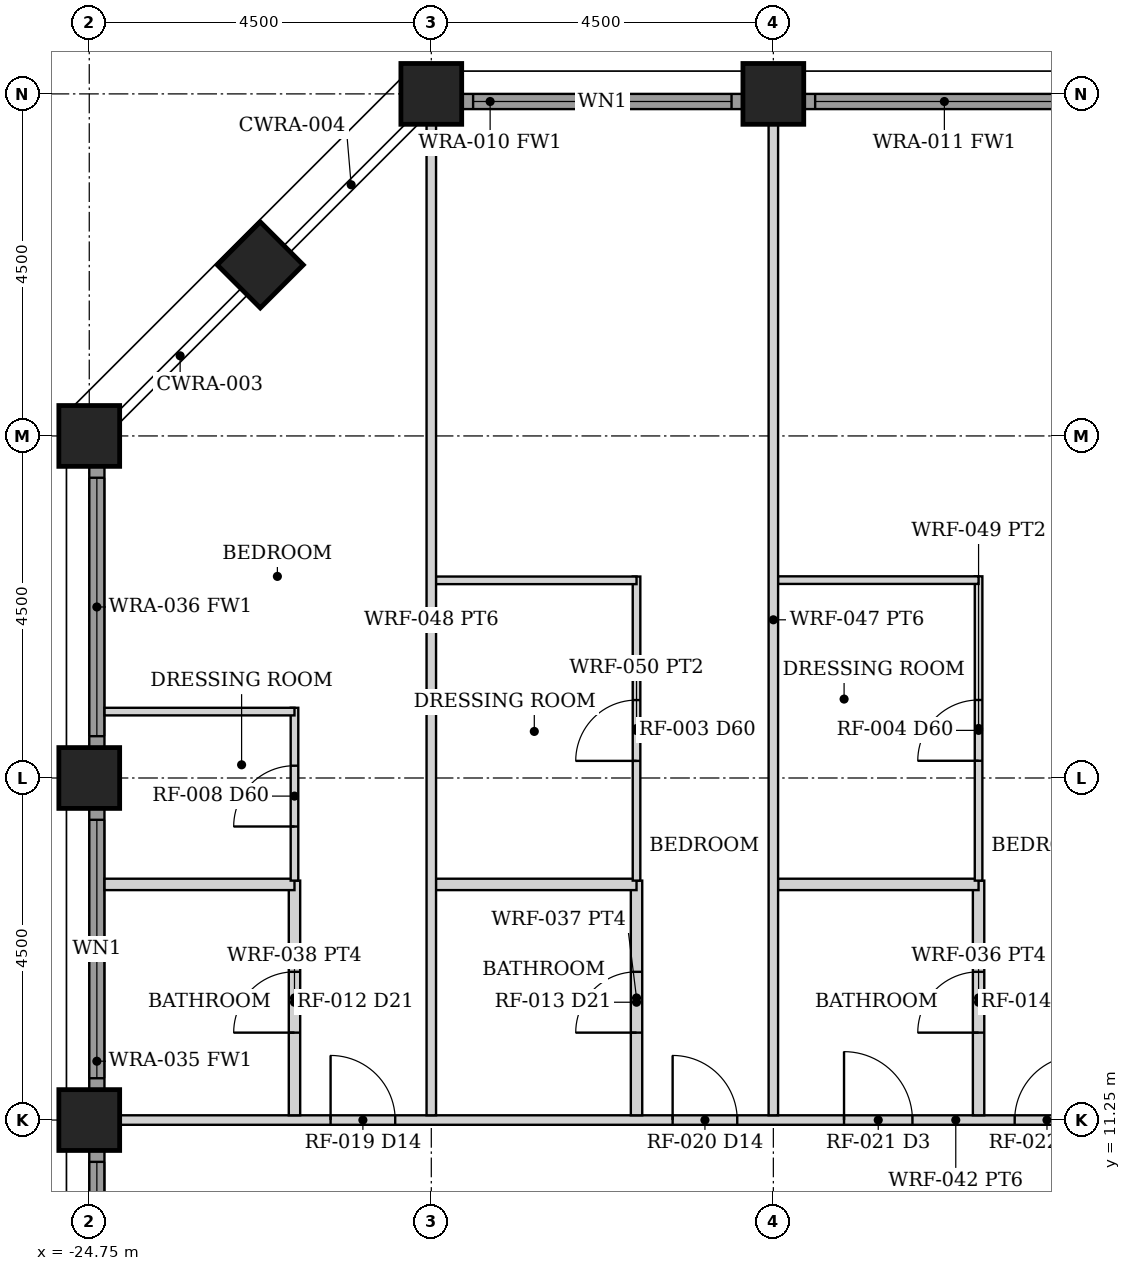
"""IFC4 building model, lengths in metres.
Left out: names, types, materials, properties, quantities, classifications, styles, units other than length and angle.
Written with IfcOpenShell. Run it as: python <this file> out.ifc"""

import sys

from ifc_helpers import new_model, si_unit, direction, frame, frame_2d, origin, origin_2d, place, context, subcontext, project, spatial, rectangle, hollow_rectangle, extrude, element, fill, save


model = new_model("IFC4")
c1 = context("Model", 3, precision=1e-05, world=origin(), true_north=direction((0.0, 1.0)))
c2 = subcontext(c1, "Body", "Model", "MODEL_VIEW")
j1 = project(units=[si_unit("LENGTHUNIT", "METRE"), si_unit("PLANEANGLEUNIT", "RADIAN")], contexts=[c1])
p1 = place(None, origin())
s1 = spatial("IfcSite", under=j1, at=p1, CompositionType="ELEMENT")
p2 = place(p1, origin())
s2 = spatial("IfcBuilding", under=s1, at=p2, CompositionType="ELEMENT")
p3 = place(p2, frame((0.0, 0.0, 79.0)))
s3 = spatial("IfcBuildingStorey", under=s2, at=p3, CompositionType="ELEMENT", Elevation=79.0)
for number, where, z_axis, x_axis in (
    (1, (-20.25, 24.75, 0.0), (0.0, 0.0, 1.0), (0.0, 1.0, 0.0)),
    (2, (-15.75, 24.75, 0.0), (0.0, 0.0, 1.0), (0.0, 1.0, 0.0)),
    (3, (-24.75, 11.25, 0.0), (0.0, 0.0, 1.0), (1.0, 0.0, 0.0)),
    (4, (-24.75, 15.75, 0.0), (0.0, 0.0, 1.0), (1.0, 0.0, 0.0)),
    (5, (-24.75, 20.25, 0.0), (0.0, 0.0, 1.0), (1.0, 0.0, 0.0)),
    (6, (-22.5, 22.5, 0.0), (0.0, 0.0, 1.0), (0.707, -0.707, 0.0)),
):
    element("IfcColumn", number, at=place(p3, frame(where, z_axis=z_axis, x_axis=x_axis)), inside=s3, PredefinedType="COLUMN", context=c2, shape_type="SweptSolid", body=[
        extrude(hollow_rectangle(XDim=0.8, YDim=0.8, WallThickness=0.06, at=origin_2d()), origin(), (0.0, 0.0, 1.0), 3.5),
    ])
p4 = place(p3, frame((-19.845, 24.65, 0.0), z_axis=(0.0, 0.0, 1.0), x_axis=(1.0, 0.0, 0.0)))
e7 = element("IfcWall", 7, at=p4, inside=s3, PredefinedType="SOLIDWALL", context=c2, shape_type="SweptSolid", body=[
    extrude(rectangle(XDim=3.69, YDim=0.2, at=frame_2d((1.845, 0.0))), origin(), (0.0, 0.0, 1.0), 2.379),
])
p5 = place(p4, frame((0.145, 0.0, 0.3)))
e8 = element("IfcOpeningElement", 8, at=p5, cuts=e7, PredefinedType="OPENING", context=c2, shape_type="SweptSolid", body=[
    extrude(rectangle(XDim=3.4, YDim=1.929, at=frame_2d((1.7, 0.964))), frame((0.0, 0.11, 0.0), z_axis=(0.0, -1.0, 0.0), x_axis=(1.0, 0.0, 0.0)), (0.0, 0.0, 1.0), 0.22),
])
p6 = place(p3, frame((-15.345, 24.65, 0.0), z_axis=(0.0, 0.0, 1.0), x_axis=(1.0, 0.0, 0.0)))
e9 = element("IfcWall", 9, at=p6, inside=s3, PredefinedType="SOLIDWALL", context=c2, shape_type="SweptSolid", body=[
    extrude(rectangle(XDim=3.69, YDim=0.2, at=frame_2d((1.845, 0.0))), origin(), (0.0, 0.0, 1.0), 2.379),
])
p7 = place(p6, frame((0.145, 0.0, 0.3)))
e10 = element("IfcOpeningElement", 10, at=p7, cuts=e9, PredefinedType="OPENING", context=c2, shape_type="SweptSolid", body=[
    extrude(rectangle(XDim=3.4, YDim=1.929, at=frame_2d((1.7, 0.964))), frame((0.0, 0.11, 0.0), z_axis=(0.0, -1.0, 0.0), x_axis=(1.0, 0.0, 0.0)), (0.0, 0.0, 1.0), 0.22),
])
p8 = place(p3, frame((-24.65, 7.155, 0.0), z_axis=(0.0, 0.0, 1.0), x_axis=(0.0, 1.0, 0.0)))
e11 = element("IfcWall", 11, at=p8, inside=s3, PredefinedType="SOLIDWALL", context=c2, shape_type="SweptSolid", body=[
    extrude(rectangle(XDim=3.69, YDim=0.2, at=frame_2d((1.845, 0.0))), origin(), (0.0, 0.0, 1.0), 2.379),
])
p9 = place(p8, frame((0.145, 0.0, 0.3)))
e12 = element("IfcOpeningElement", 12, at=p9, cuts=e11, PredefinedType="OPENING", context=c2, shape_type="SweptSolid", body=[
    extrude(rectangle(XDim=3.4, YDim=1.929, at=frame_2d((1.7, 0.964))), frame((0.0, 0.11, 0.0), z_axis=(0.0, -1.0, 0.0), x_axis=(1.0, 0.0, 0.0)), (0.0, 0.0, 1.0), 0.22),
])
p10 = place(p3, frame((-24.65, 11.655, 0.0), z_axis=(0.0, 0.0, 1.0), x_axis=(0.0, 1.0, 0.0)))
e13 = element("IfcWall", 13, at=p10, inside=s3, PredefinedType="SOLIDWALL", context=c2, shape_type="SweptSolid", body=[
    extrude(rectangle(XDim=3.69, YDim=0.2, at=frame_2d((1.845, 0.0))), origin(), (0.0, 0.0, 1.0), 2.379),
])
p11 = place(p10, frame((0.145, 0.0, 0.3)))
e14 = element("IfcOpeningElement", 14, at=p11, cuts=e13, PredefinedType="OPENING", context=c2, shape_type="SweptSolid", body=[
    extrude(rectangle(XDim=3.4, YDim=1.929, at=frame_2d((1.7, 0.964))), frame((0.0, 0.11, 0.0), z_axis=(0.0, -1.0, 0.0), x_axis=(1.0, 0.0, 0.0)), (0.0, 0.0, 1.0), 0.22),
])
p12 = place(p3, frame((-24.65, 16.155, 0.0), z_axis=(0.0, 0.0, 1.0), x_axis=(0.0, 1.0, 0.0)))
e15 = element("IfcWall", 15, at=p12, inside=s3, PredefinedType="SOLIDWALL", context=c2, shape_type="SweptSolid", body=[
    extrude(rectangle(XDim=3.69, YDim=0.2, at=frame_2d((1.845, 0.0))), origin(), (0.0, 0.0, 1.0), 2.379),
])
p13 = place(p12, frame((0.145, 0.0, 0.3)))
e16 = element("IfcOpeningElement", 16, at=p13, cuts=e15, PredefinedType="OPENING", context=c2, shape_type="SweptSolid", body=[
    extrude(rectangle(XDim=3.4, YDim=1.929, at=frame_2d((1.7, 0.964))), frame((0.0, 0.11, 0.0), z_axis=(0.0, -1.0, 0.0), x_axis=(1.0, 0.0, 0.0)), (0.0, 0.0, 1.0), 0.22),
])
p14 = place(p3, frame((-24.35, 11.25, 0.0), z_axis=(0.0, 0.0, 1.0), x_axis=(1.0, 0.0, 0.0)))
e17 = element("IfcWall", 17, at=p14, inside=s3, PredefinedType="PARTITIONING", context=c2, shape_type="SweptSolid", body=[
    extrude(rectangle(XDim=22.0, YDim=0.125, at=frame_2d((11.0, 0.0))), origin(), (0.0, 0.0, 1.0), 2.373),
])
p15 = place(p14, frame((20.25, 0.0, 0.0)))
e18 = element("IfcOpeningElement", 18, at=p15, cuts=e17, PredefinedType="OPENING", context=c2, shape_type="SweptSolid", body=[
    extrude(rectangle(XDim=0.9, YDim=2.1, at=frame_2d((0.45, 1.05))), frame((0.0, 0.073, 0.0), z_axis=(0.0, -1.0, 0.0), x_axis=(1.0, 0.0, 0.0)), (0.0, 0.0, 1.0), 0.145),
])
p16 = place(p14, frame((14.65, 0.0, 0.0)))
e19 = element("IfcOpeningElement", 19, at=p16, cuts=e17, PredefinedType="OPENING", context=c2, shape_type="SweptSolid", body=[
    extrude(rectangle(XDim=1.4, YDim=2.1, at=frame_2d((0.7, 1.05))), frame((0.0, 0.073, 0.0), z_axis=(0.0, -1.0, 0.0), x_axis=(1.0, 0.0, 0.0)), (0.0, 0.0, 1.0), 0.145),
])
p17 = place(p14, frame((11.775, 0.0, 0.0)))
e20 = element("IfcOpeningElement", 20, at=p17, cuts=e17, PredefinedType="OPENING", context=c2, shape_type="SweptSolid", body=[
    extrude(rectangle(XDim=0.85, YDim=2.1, at=frame_2d((0.425, 1.05))), frame((0.0, 0.073, 0.0), z_axis=(0.0, -1.0, 0.0), x_axis=(1.0, 0.0, 0.0)), (0.0, 0.0, 1.0), 0.145),
])
p18 = place(p14, frame((9.53, 0.0, 0.0)))
e21 = element("IfcOpeningElement", 21, at=p18, cuts=e17, PredefinedType="OPENING", context=c2, shape_type="SweptSolid", body=[
    extrude(rectangle(XDim=0.9, YDim=2.1, at=frame_2d((0.45, 1.05))), frame((0.0, 0.073, 0.0), z_axis=(0.0, -1.0, 0.0), x_axis=(1.0, 0.0, 0.0)), (0.0, 0.0, 1.0), 0.145),
])
p19 = place(p14, frame((7.275, 0.0, 0.0)))
e22 = element("IfcOpeningElement", 22, at=p19, cuts=e17, PredefinedType="OPENING", context=c2, shape_type="SweptSolid", body=[
    extrude(rectangle(XDim=0.85, YDim=2.1, at=frame_2d((0.425, 1.05))), frame((0.0, 0.073, 0.0), z_axis=(0.0, -1.0, 0.0), x_axis=(1.0, 0.0, 0.0)), (0.0, 0.0, 1.0), 0.145),
])
p20 = place(p14, frame((2.775, 0.0, 0.0)))
e23 = element("IfcOpeningElement", 23, at=p20, cuts=e17, PredefinedType="OPENING", context=c2, shape_type="SweptSolid", body=[
    extrude(rectangle(XDim=0.85, YDim=2.1, at=frame_2d((0.425, 1.05))), frame((0.0, 0.073, 0.0), z_axis=(0.0, -1.0, 0.0), x_axis=(1.0, 0.0, 0.0)), (0.0, 0.0, 1.0), 0.145),
])
p21 = place(p3, frame((-13.05, 11.312, 0.0), z_axis=(0.0, 0.0, 1.0), x_axis=(0.0, 1.0, 0.0)))
e24 = element("IfcWall", 24, at=p21, inside=s3, PredefinedType="PARTITIONING", context=c2, shape_type="SweptSolid", body=[
    extrude(rectangle(XDim=3.087, YDim=0.15, at=frame_2d((1.544, 0.0))), origin(), (0.0, 0.0, 1.0), 2.373),
])
p22 = place(p21, frame((1.087, 0.0, 0.0)))
e25 = element("IfcOpeningElement", 25, at=p22, cuts=e24, PredefinedType="OPENING", context=c2, shape_type="SweptSolid", body=[
    extrude(rectangle(XDim=0.8, YDim=2.1, at=frame_2d((0.4, 1.05))), frame((0.0, 0.085, 0.0), z_axis=(0.0, -1.0, 0.0), x_axis=(1.0, 0.0, 0.0)), (0.0, 0.0, 1.0), 0.17),
])
p23 = place(p3, frame((-15.69, 14.35, 0.0), z_axis=(0.0, 0.0, 1.0), x_axis=(1.0, 0.0, 0.0)))
e26 = element("IfcWall", 26, at=p23, inside=s3, PredefinedType="PARTITIONING", context=c2, shape_type="SweptSolid", body=[
    extrude(rectangle(XDim=2.64, YDim=0.15, at=frame_2d((1.32, 0.0))), origin(), (0.0, 0.0, 1.0), 2.373),
])
p24 = place(p3, frame((-13.05, 14.4, 0.0), z_axis=(0.0, 0.0, 1.0), x_axis=(0.0, 1.0, 0.0)))
e27 = element("IfcWall", 27, at=p24, inside=s3, PredefinedType="PARTITIONING", context=c2, shape_type="SweptSolid", body=[
    extrude(rectangle(XDim=4.003, YDim=0.1, at=frame_2d((2.001, 0.0))), origin(), (0.0, 0.0, 1.0), 2.373),
])
p25 = place(p24, frame((1.576, 0.0, 0.0)))
e28 = element("IfcOpeningElement", 28, at=p25, cuts=e27, PredefinedType="OPENING", context=c2, shape_type="SweptSolid", body=[
    extrude(rectangle(XDim=0.8, YDim=2.1, at=frame_2d((0.4, 1.05))), frame((0.0, 0.06, 0.0), z_axis=(0.0, -1.0, 0.0), x_axis=(1.0, 0.0, 0.0)), (0.0, 0.0, 1.0), 0.12),
])
p26 = place(p3, frame((-15.69, 18.353, 0.0), z_axis=(0.0, 0.0, 1.0), x_axis=(1.0, 0.0, 0.0)))
e29 = element("IfcWall", 29, at=p26, inside=s3, PredefinedType="PARTITIONING", context=c2, shape_type="SweptSolid", body=[
    extrude(rectangle(XDim=2.64, YDim=0.1, at=frame_2d((1.32, 0.0))), origin(), (0.0, 0.0, 1.0), 2.373),
])
p27 = place(p3, frame((-15.75, 11.312, 0.0), z_axis=(0.0, 0.0, 1.0), x_axis=(0.0, 1.0, 0.0)))
e30 = element("IfcWall", 30, at=p27, inside=s3, PredefinedType="PARTITIONING", context=c2, shape_type="SweptSolid", body=[
    extrude(rectangle(XDim=13.038, YDim=0.125, at=frame_2d((6.519, 0.0))), origin(), (0.0, 0.0, 1.0), 2.373),
])
p28 = place(p3, frame((-17.55, 11.312, 0.0), z_axis=(0.0, 0.0, 1.0), x_axis=(0.0, 1.0, 0.0)))
e31 = element("IfcWall", 31, at=p28, inside=s3, PredefinedType="PARTITIONING", context=c2, shape_type="SweptSolid", body=[
    extrude(rectangle(XDim=3.087, YDim=0.15, at=frame_2d((1.544, 0.0))), origin(), (0.0, 0.0, 1.0), 2.373),
])
p29 = place(p28, frame((1.087, 0.0, 0.0)))
e32 = element("IfcOpeningElement", 32, at=p29, cuts=e31, PredefinedType="OPENING", context=c2, shape_type="SweptSolid", body=[
    extrude(rectangle(XDim=0.8, YDim=2.1, at=frame_2d((0.4, 1.05))), frame((0.0, 0.085, 0.0), z_axis=(0.0, -1.0, 0.0), x_axis=(1.0, 0.0, 0.0)), (0.0, 0.0, 1.0), 0.17),
])
p30 = place(p3, frame((-20.19, 14.35, 0.0), z_axis=(0.0, 0.0, 1.0), x_axis=(1.0, 0.0, 0.0)))
e33 = element("IfcWall", 33, at=p30, inside=s3, PredefinedType="PARTITIONING", context=c2, shape_type="SweptSolid", body=[
    extrude(rectangle(XDim=2.64, YDim=0.15, at=frame_2d((1.32, 0.0))), origin(), (0.0, 0.0, 1.0), 2.373),
])
p31 = place(p3, frame((-17.55, 14.4, 0.0), z_axis=(0.0, 0.0, 1.0), x_axis=(0.0, 1.0, 0.0)))
e34 = element("IfcWall", 34, at=p31, inside=s3, PredefinedType="PARTITIONING", context=c2, shape_type="SweptSolid", body=[
    extrude(rectangle(XDim=4.0, YDim=0.1, at=frame_2d((2.0, 0.0))), origin(), (0.0, 0.0, 1.0), 2.373),
])
p32 = place(p31, frame((1.575, 0.0, 0.0)))
e35 = element("IfcOpeningElement", 35, at=p32, cuts=e34, PredefinedType="OPENING", context=c2, shape_type="SweptSolid", body=[
    extrude(rectangle(XDim=0.8, YDim=2.1, at=frame_2d((0.4, 1.05))), frame((0.0, 0.06, 0.0), z_axis=(0.0, -1.0, 0.0), x_axis=(1.0, 0.0, 0.0)), (0.0, 0.0, 1.0), 0.12),
])
p33 = place(p3, frame((-20.19, 18.35, 0.0), z_axis=(0.0, 0.0, 1.0), x_axis=(1.0, 0.0, 0.0)))
e36 = element("IfcWall", 36, at=p33, inside=s3, PredefinedType="PARTITIONING", context=c2, shape_type="SweptSolid", body=[
    extrude(rectangle(XDim=2.64, YDim=0.1, at=frame_2d((1.32, 0.0))), origin(), (0.0, 0.0, 1.0), 2.373),
])
p34 = place(p3, frame((-20.25, 11.312, 0.0), z_axis=(0.0, 0.0, 1.0), x_axis=(0.0, 1.0, 0.0)))
e37 = element("IfcWall", 37, at=p34, inside=s3, PredefinedType="PARTITIONING", context=c2, shape_type="SweptSolid", body=[
    extrude(rectangle(XDim=13.038, YDim=0.125, at=frame_2d((6.519, 0.0))), origin(), (0.0, 0.0, 1.0), 2.373),
])
p35 = place(p3, frame((-22.05, 11.312, 0.0), z_axis=(0.0, 0.0, 1.0), x_axis=(0.0, 1.0, 0.0)))
e38 = element("IfcWall", 38, at=p35, inside=s3, PredefinedType="PARTITIONING", context=c2, shape_type="SweptSolid", body=[
    extrude(rectangle(XDim=3.087, YDim=0.15, at=frame_2d((1.544, 0.0))), origin(), (0.0, 0.0, 1.0), 2.373),
])
p36 = place(p35, frame((1.087, 0.0, 0.0)))
e39 = element("IfcOpeningElement", 39, at=p36, cuts=e38, PredefinedType="OPENING", context=c2, shape_type="SweptSolid", body=[
    extrude(rectangle(XDim=0.8, YDim=2.1, at=frame_2d((0.4, 1.05))), frame((0.0, 0.085, 0.0), z_axis=(0.0, -1.0, 0.0), x_axis=(1.0, 0.0, 0.0)), (0.0, 0.0, 1.0), 0.17),
])
p37 = place(p3, frame((-24.55, 14.35, 0.0), z_axis=(0.0, 0.0, 1.0), x_axis=(1.0, 0.0, 0.0)))
e40 = element("IfcWall", 40, at=p37, inside=s3, PredefinedType="PARTITIONING", context=c2, shape_type="SweptSolid", body=[
    extrude(rectangle(XDim=2.5, YDim=0.15, at=frame_2d((1.25, 0.0))), origin(), (0.0, 0.0, 1.0), 2.373),
])
p38 = place(p3, frame((-22.05, 14.4, 0.0), z_axis=(0.0, 0.0, 1.0), x_axis=(0.0, 1.0, 0.0)))
e41 = element("IfcWall", 41, at=p38, inside=s3, PredefinedType="PARTITIONING", context=c2, shape_type="SweptSolid", body=[
    extrude(rectangle(XDim=2.274, YDim=0.1, at=frame_2d((1.137, 0.0))), origin(), (0.0, 0.0, 1.0), 2.373),
])
p39 = place(p38, frame((0.712, 0.0, 0.0)))
e42 = element("IfcOpeningElement", 42, at=p39, cuts=e41, PredefinedType="OPENING", context=c2, shape_type="SweptSolid", body=[
    extrude(rectangle(XDim=0.8, YDim=2.1, at=frame_2d((0.4, 1.05))), frame((0.0, 0.06, 0.0), z_axis=(0.0, -1.0, 0.0), x_axis=(1.0, 0.0, 0.0)), (0.0, 0.0, 1.0), 0.12),
])
p40 = place(p3, frame((-24.55, 16.624, 0.0), z_axis=(0.0, 0.0, 1.0), x_axis=(1.0, 0.0, 0.0)))
e43 = element("IfcWall", 43, at=p40, inside=s3, PredefinedType="PARTITIONING", context=c2, shape_type="SweptSolid", body=[
    extrude(rectangle(XDim=2.5, YDim=0.1, at=frame_2d((1.25, 0.0))), origin(), (0.0, 0.0, 1.0), 2.373),
])
p41 = place(p5, origin())
e44 = element("IfcWindow", 44, at=p41, inside=s3, PartitioningType="SINGLE_PANEL", PredefinedType="WINDOW", context=c2, shape_type="SweptSolid", body=[
    extrude(rectangle(XDim=3.4, YDim=1.929, at=frame_2d((1.7, 0.964))), frame((0.0, 0.03, 0.0), z_axis=(0.0, -1.0, 0.0), x_axis=(1.0, 0.0, 0.0)), (0.0, 0.0, 1.0), 0.06),
])
fill(e8, e44)
p42 = place(p7, origin())
e45 = element("IfcWindow", 45, at=p42, inside=s3, PartitioningType="SINGLE_PANEL", PredefinedType="WINDOW", context=c2, shape_type="SweptSolid", body=[
    extrude(rectangle(XDim=3.4, YDim=1.929, at=frame_2d((1.7, 0.964))), frame((0.0, 0.03, 0.0), z_axis=(0.0, -1.0, 0.0), x_axis=(1.0, 0.0, 0.0)), (0.0, 0.0, 1.0), 0.06),
])
fill(e10, e45)
p43 = place(p9, origin())
e46 = element("IfcWindow", 46, at=p43, inside=s3, PartitioningType="SINGLE_PANEL", PredefinedType="WINDOW", context=c2, shape_type="SweptSolid", body=[
    extrude(rectangle(XDim=3.4, YDim=1.929, at=frame_2d((1.7, 0.964))), frame((0.0, 0.03, 0.0), z_axis=(0.0, -1.0, 0.0), x_axis=(1.0, 0.0, 0.0)), (0.0, 0.0, 1.0), 0.06),
])
fill(e12, e46)
p44 = place(p11, origin())
e47 = element("IfcWindow", 47, at=p44, inside=s3, PartitioningType="SINGLE_PANEL", PredefinedType="WINDOW", context=c2, shape_type="SweptSolid", body=[
    extrude(rectangle(XDim=3.4, YDim=1.929, at=frame_2d((1.7, 0.964))), frame((0.0, 0.03, 0.0), z_axis=(0.0, -1.0, 0.0), x_axis=(1.0, 0.0, 0.0)), (0.0, 0.0, 1.0), 0.06),
])
fill(e14, e47)
p45 = place(p13, origin())
e48 = element("IfcWindow", 48, at=p45, inside=s3, PartitioningType="SINGLE_PANEL", PredefinedType="WINDOW", context=c2, shape_type="SweptSolid", body=[
    extrude(rectangle(XDim=3.4, YDim=1.929, at=frame_2d((1.7, 0.964))), frame((0.0, 0.03, 0.0), z_axis=(0.0, -1.0, 0.0), x_axis=(1.0, 0.0, 0.0)), (0.0, 0.0, 1.0), 0.06),
])
fill(e16, e48)
p46 = place(p17, origin())
e49 = element("IfcDoor", 49, at=p46, inside=s3, OperationType="SINGLE_SWING_RIGHT", PredefinedType="DOOR", context=c2, shape_type="SweptSolid", body=[
    extrude(rectangle(XDim=0.85, YDim=2.1, at=frame_2d((0.425, 1.05))), frame((0.0, 0.025, 0.0), z_axis=(0.0, -1.0, 0.0), x_axis=(1.0, 0.0, 0.0)), (0.0, 0.0, 1.0), 0.05),
])
fill(e20, e49)
p47 = place(p22, origin())
e50 = element("IfcDoor", 50, at=p47, inside=s3, OperationType="SINGLE_SWING_LEFT", PredefinedType="DOOR", context=c2, shape_type="SweptSolid", body=[
    extrude(rectangle(XDim=0.8, YDim=2.1, at=frame_2d((0.4, 1.05))), frame((0.0, 0.025, 0.0), z_axis=(0.0, -1.0, 0.0), x_axis=(1.0, 0.0, 0.0)), (0.0, 0.0, 1.0), 0.05),
])
fill(e25, e50)
p48 = place(p18, origin())
e51 = element("IfcDoor", 51, at=p48, inside=s3, OperationType="SINGLE_SWING_LEFT", PredefinedType="DOOR", context=c2, shape_type="SweptSolid", body=[
    extrude(rectangle(XDim=0.9, YDim=2.1, at=frame_2d((0.45, 1.05))), frame((0.0, 0.025, 0.0), z_axis=(0.0, -1.0, 0.0), x_axis=(1.0, 0.0, 0.0)), (0.0, 0.0, 1.0), 0.05),
])
fill(e21, e51)
p49 = place(p25, origin())
e52 = element("IfcDoor", 52, at=p49, inside=s3, OperationType="SINGLE_SWING_LEFT", PredefinedType="DOOR", context=c2, shape_type="SweptSolid", body=[
    extrude(rectangle(XDim=0.8, YDim=2.1, at=frame_2d((0.4, 1.05))), frame((0.0, 0.025, 0.0), z_axis=(0.0, -1.0, 0.0), x_axis=(1.0, 0.0, 0.0)), (0.0, 0.0, 1.0), 0.05),
])
fill(e28, e52)
p50 = place(p19, origin())
e53 = element("IfcDoor", 53, at=p50, inside=s3, OperationType="SINGLE_SWING_LEFT", PredefinedType="DOOR", context=c2, shape_type="SweptSolid", body=[
    extrude(rectangle(XDim=0.85, YDim=2.1, at=frame_2d((0.425, 1.05))), frame((0.0, 0.025, 0.0), z_axis=(0.0, -1.0, 0.0), x_axis=(1.0, 0.0, 0.0)), (0.0, 0.0, 1.0), 0.05),
])
fill(e22, e53)
p51 = place(p29, origin())
e54 = element("IfcDoor", 54, at=p51, inside=s3, OperationType="SINGLE_SWING_LEFT", PredefinedType="DOOR", context=c2, shape_type="SweptSolid", body=[
    extrude(rectangle(XDim=0.8, YDim=2.1, at=frame_2d((0.4, 1.05))), frame((0.0, 0.025, 0.0), z_axis=(0.0, -1.0, 0.0), x_axis=(1.0, 0.0, 0.0)), (0.0, 0.0, 1.0), 0.05),
])
fill(e32, e54)
p52 = place(p32, origin())
e55 = element("IfcDoor", 55, at=p52, inside=s3, OperationType="SINGLE_SWING_LEFT", PredefinedType="DOOR", context=c2, shape_type="SweptSolid", body=[
    extrude(rectangle(XDim=0.8, YDim=2.1, at=frame_2d((0.4, 1.05))), frame((0.0, 0.025, 0.0), z_axis=(0.0, -1.0, 0.0), x_axis=(1.0, 0.0, 0.0)), (0.0, 0.0, 1.0), 0.05),
])
fill(e35, e55)
p53 = place(p20, origin())
e56 = element("IfcDoor", 56, at=p53, inside=s3, OperationType="SINGLE_SWING_LEFT", PredefinedType="DOOR", context=c2, shape_type="SweptSolid", body=[
    extrude(rectangle(XDim=0.85, YDim=2.1, at=frame_2d((0.425, 1.05))), frame((0.0, 0.025, 0.0), z_axis=(0.0, -1.0, 0.0), x_axis=(1.0, 0.0, 0.0)), (0.0, 0.0, 1.0), 0.05),
])
fill(e23, e56)
p54 = place(p36, origin())
e57 = element("IfcDoor", 57, at=p54, inside=s3, OperationType="SINGLE_SWING_LEFT", PredefinedType="DOOR", context=c2, shape_type="SweptSolid", body=[
    extrude(rectangle(XDim=0.8, YDim=2.1, at=frame_2d((0.4, 1.05))), frame((0.0, 0.025, 0.0), z_axis=(0.0, -1.0, 0.0), x_axis=(1.0, 0.0, 0.0)), (0.0, 0.0, 1.0), 0.05),
])
fill(e39, e57)
p55 = place(p39, origin())
e58 = element("IfcDoor", 58, at=p55, inside=s3, OperationType="SINGLE_SWING_LEFT", PredefinedType="DOOR", context=c2, shape_type="SweptSolid", body=[
    extrude(rectangle(XDim=0.8, YDim=2.1, at=frame_2d((0.4, 1.05))), frame((0.0, 0.025, 0.0), z_axis=(0.0, -1.0, 0.0), x_axis=(1.0, 0.0, 0.0)), (0.0, 0.0, 1.0), 0.05),
])
fill(e42, e58)
save(model, sys.argv[1])
